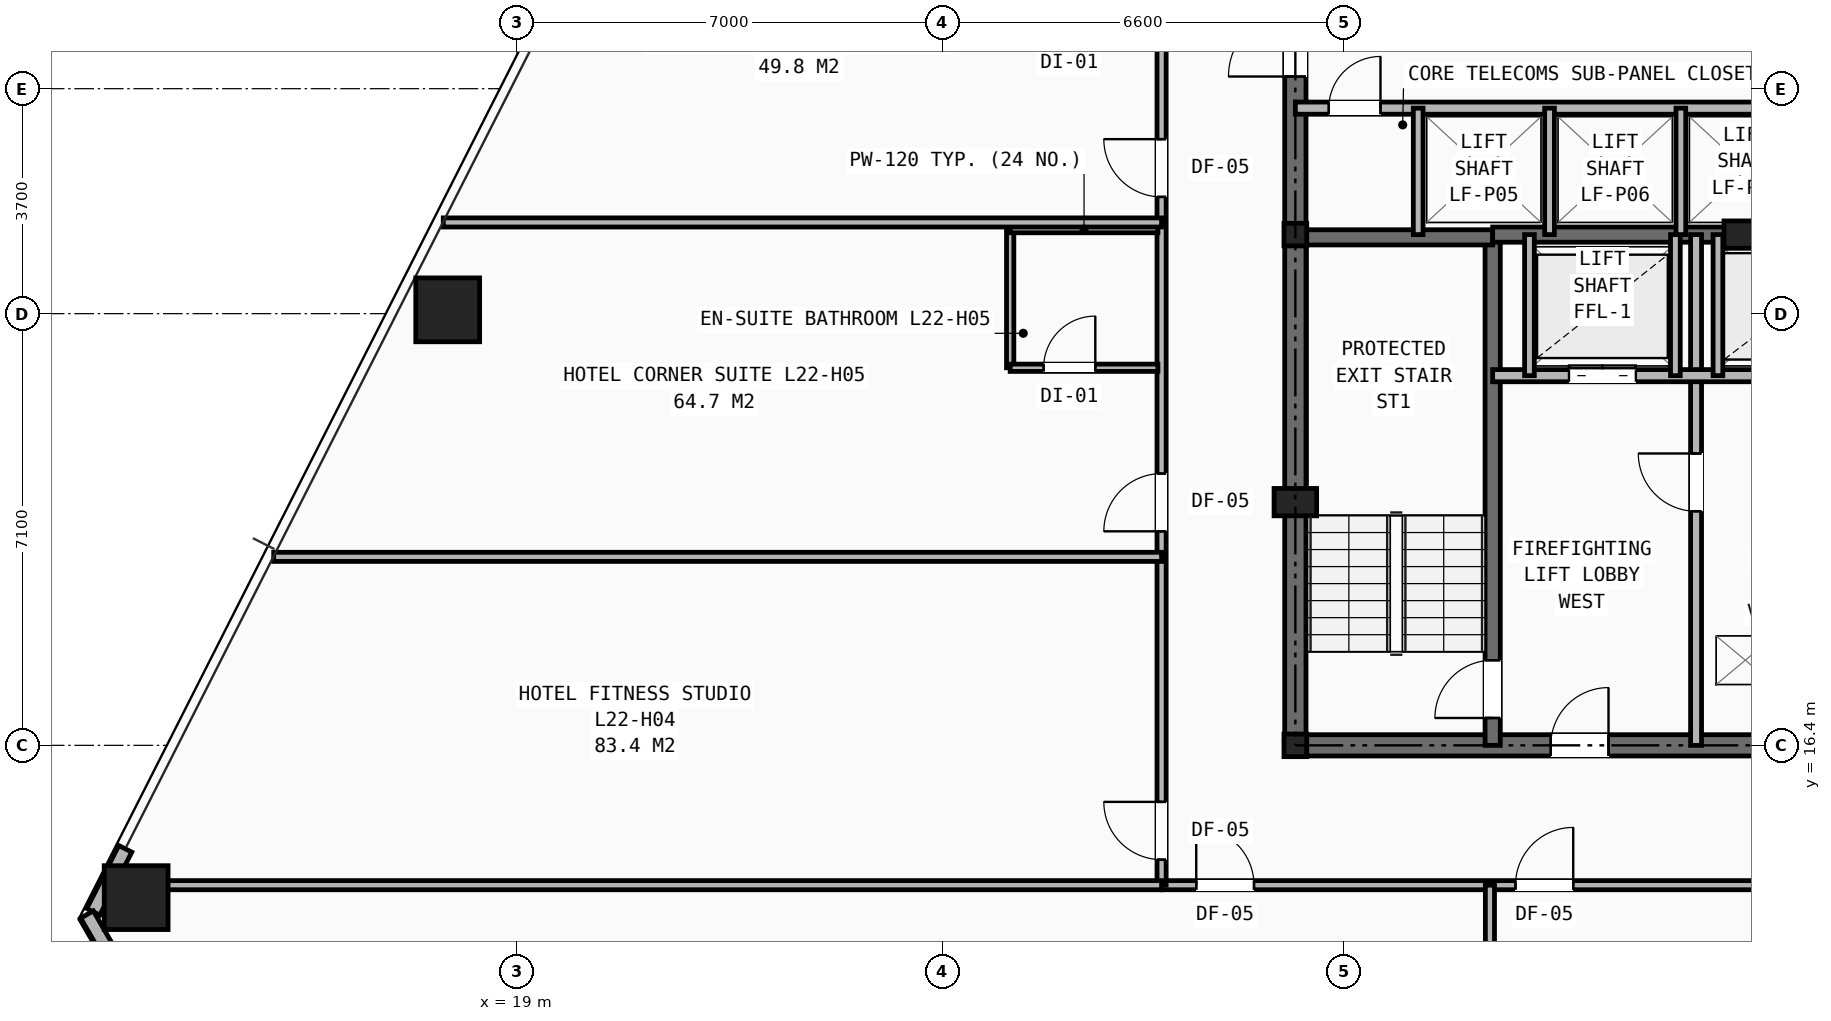
"""IFC4 building model, lengths in metres.
Left out: names, types, materials, properties, quantities, classifications, styles, units other than length and angle.
Written with IfcOpenShell. Run it as: python <this file> out.ifc"""

import sys

from ifc_helpers import new_model, si_unit, direction, frame, frame_2d, origin, origin_2d, place, context, subcontext, project, spatial, rectangle, hollow_rectangle, i_section, extrude, element, fill, save


model = new_model("IFC4")
c1 = context("Model", 3, precision=1e-05, world=origin(), true_north=direction((0.0, 1.0)))
c2 = subcontext(c1, "Body", "Model", "MODEL_VIEW")
j1 = project(units=[si_unit("LENGTHUNIT", "METRE"), si_unit("PLANEANGLEUNIT", "RADIAN")], contexts=[c1])
p1 = place(None, origin())
s1 = spatial("IfcSite", under=j1, at=p1, CompositionType="ELEMENT")
p2 = place(p1, origin())
s2 = spatial("IfcBuilding", under=s1, at=p2, CompositionType="ELEMENT")
p3 = place(p2, frame((0.0, 0.0, 79.8)))
s3 = spatial("IfcBuildingStorey", under=s2, at=p3, CompositionType="ELEMENT", Elevation=79.8)
for number, where, z_axis, x_axis in (
    (1, (31.8, 16.4, 0.0), (0.0, 0.0, 1.0), (1.0, 0.0, 0.0)),
    (2, (31.8, 24.8, 0.0), (0.0, 0.0, 1.0), (1.0, 0.0, 0.0)),
):
    element("IfcColumn", number, at=place(p3, frame(where, z_axis=z_axis, x_axis=x_axis)), inside=s3, PredefinedType="COLUMN", context=c2, shape_type="SweptSolid", body=[
        extrude(i_section(OverallWidth=0.374, OverallDepth=0.372, WebThickness=0.016, FlangeThickness=0.026, at=origin_2d()), origin(), (0.0, 0.0, 1.0), 3.2),
    ])
for number, where, z_axis, x_axis in (
    (3, (31.8, 20.4, 0.0), (0.0, 0.0, 1.0), (1.0, 0.0, 0.0)),
    (4, (39.2, 24.8, 0.0), (0.0, 0.0, 1.0), (1.0, 0.0, 0.0)),
):
    element("IfcColumn", number, at=place(p3, frame(where, z_axis=z_axis, x_axis=x_axis)), inside=s3, PredefinedType="PILASTER", context=c2, shape_type="SweptSolid", body=[
        extrude(rectangle(XDim=0.7, YDim=0.45, at=origin_2d()), origin(), (0.0, 0.0, 1.0), 3.2),
    ])
for number, where, z_axis, x_axis in (
    (5, (17.86, 23.563, 0.0), (0.0, 0.0, 1.0), (1.0, 0.0, 0.0)),
    (6, (12.736, 13.896, 0.0), (0.0, 0.0, 1.0), (1.0, 0.0, 0.0)),
):
    element("IfcColumn", number, at=place(p3, frame(where, z_axis=z_axis, x_axis=x_axis)), inside=s3, PredefinedType="COLUMN", context=c2, shape_type="SweptSolid", body=[
        extrude(hollow_rectangle(XDim=1.05, YDim=1.05, WallThickness=0.07, at=origin_2d()), origin(), (0.0, 0.0, 1.0), 3.2),
    ])
p4 = place(p3, frame((12.557, 14.698, 0.0), z_axis=(0.0, 0.0, 1.0), x_axis=(-0.452163091908, -0.891935276977, 0.0)))
e7 = element("IfcWall", 7, at=p4, inside=s3, PredefinedType="SHEAR", context=c2, shape_type="SweptSolid", body=[
    extrude(rectangle(XDim=1.163, YDim=0.24, at=frame_2d((0.581, 0.0))), origin(), (0.0, 0.0, 1.0), 2.253),
])
p5 = place(p3, frame((16.799, 5.18, 0.0), z_axis=(0.0, 0.0, 1.0), x_axis=(-0.499984915177, 0.866034112836, 0.0)))
e8 = element("IfcWall", 8, at=p5, inside=s3, PredefinedType="SHEAR", context=c2, shape_type="SweptSolid", body=[
    extrude(rectangle(XDim=9.743, YDim=0.24, at=frame_2d((4.872, 0.0))), origin(), (0.0, 0.0, 1.0), 2.253),
])
p6 = place(p3, frame((31.8, 16.4, 0.0), z_axis=(0.0, 0.0, 1.0), x_axis=(1.0, 0.0, 0.0)))
e9 = element("IfcWall", 9, at=p6, inside=s3, PredefinedType="SHEAR", context=c2, shape_type="SweptSolid", body=[
    extrude(rectangle(XDim=16.4, YDim=0.35, at=frame_2d((8.2, 0.0))), origin(), (0.0, 0.0, 1.0), 2.97),
])
p7 = place(p6, frame((7.75, 0.0, 0.0)))
e10 = element("IfcOpeningElement", 10, at=p7, cuts=e9, PredefinedType="OPENING", context=c2, shape_type="SweptSolid", body=[
    extrude(rectangle(XDim=0.9, YDim=2.1, at=frame_2d((0.45, 1.05))), frame((0.0, 0.185, 0.0), z_axis=(0.0, -1.0, 0.0), x_axis=(1.0, 0.0, 0.0)), (0.0, 0.0, 1.0), 0.37),
])
p8 = place(p6, frame((4.2, 0.0, 0.0)))
e11 = element("IfcOpeningElement", 11, at=p8, cuts=e9, PredefinedType="OPENING", context=c2, shape_type="SweptSolid", body=[
    extrude(rectangle(XDim=0.95, YDim=2.1, at=frame_2d((0.475, 1.05))), frame((0.0, 0.185, 0.0), z_axis=(0.0, -1.0, 0.0), x_axis=(1.0, 0.0, 0.0)), (0.0, 0.0, 1.0), 0.37),
])
p9 = place(p6, frame((10.6, 0.0, 0.0)))
e12 = element("IfcOpeningElement", 12, at=p9, cuts=e9, PredefinedType="OPENING", context=c2, shape_type="SweptSolid", body=[
    extrude(rectangle(XDim=0.95, YDim=2.1, at=frame_2d((0.475, 1.05))), frame((0.0, 0.185, 0.0), z_axis=(0.0, -1.0, 0.0), x_axis=(1.0, 0.0, 0.0)), (0.0, 0.0, 1.0), 0.37),
])
p10 = place(p3, frame((31.8, 16.4, 0.0), z_axis=(0.0, 0.0, 1.0), x_axis=(0.0, 1.0, 0.0)))
e13 = element("IfcWall", 13, at=p10, inside=s3, PredefinedType="SHEAR", context=c2, shape_type="SweptSolid", body=[
    extrude(rectangle(XDim=14.8, YDim=0.35, at=frame_2d((7.4, 0.0))), origin(), (0.0, 0.0, 1.0), 2.97),
])
p11 = place(p10, frame((11.0, 0.0, 0.0)))
e14 = element("IfcOpeningElement", 14, at=p11, cuts=e13, PredefinedType="OPENING", context=c2, shape_type="SweptSolid", body=[
    extrude(rectangle(XDim=1.1, YDim=2.15, at=frame_2d((0.55, 1.075))), frame((0.0, 0.185, 0.0), z_axis=(0.0, -1.0, 0.0), x_axis=(1.0, 0.0, 0.0)), (0.0, 0.0, 1.0), 0.37),
])
p12 = place(p3, frame((35.045, 16.4, 0.0), z_axis=(0.0, 0.0, 1.0), x_axis=(0.0, 1.0, 0.0)))
e15 = element("IfcWall", 15, at=p12, inside=s3, PredefinedType="SHEAR", context=c2, shape_type="SweptSolid", body=[
    extrude(rectangle(XDim=8.4, YDim=0.25, at=frame_2d((4.2, 0.0))), origin(), (0.0, 0.0, 1.0), 2.97),
])
p13 = place(p12, frame((0.45, 0.0, 0.0)))
e16 = element("IfcOpeningElement", 16, at=p13, cuts=e15, PredefinedType="OPENING", context=c2, shape_type="SweptSolid", body=[
    extrude(rectangle(XDim=0.95, YDim=2.1, at=frame_2d((0.475, 1.05))), frame((0.0, 0.135, 0.0), z_axis=(0.0, -1.0, 0.0), x_axis=(1.0, 0.0, 0.0)), (0.0, 0.0, 1.0), 0.27),
])
p14 = place(p3, frame((31.8, 24.755, 0.0), z_axis=(0.0, 0.0, 1.0), x_axis=(1.0, 0.0, 0.0)))
e17 = element("IfcWall", 17, at=p14, inside=s3, PredefinedType="SHEAR", context=c2, shape_type="SweptSolid", body=[
    extrude(rectangle(XDim=3.245, YDim=0.25, at=frame_2d((1.623, 0.0))), origin(), (0.0, 0.0, 1.0), 2.97),
])
p15 = place(p3, frame((35.045, 24.8, 0.0), z_axis=(0.0, 0.0, 1.0), x_axis=(1.0, 0.0, 0.0)))
e18 = element("IfcWall", 18, at=p15, inside=s3, PredefinedType="SHEAR", context=c2, shape_type="SweptSolid", body=[
    extrude(rectangle(XDim=9.91, YDim=0.25, at=frame_2d((4.955, 0.0))), origin(), (0.0, 0.0, 1.0), 2.97),
])
p16 = place(p3, frame((38.39, 16.4, 0.0), z_axis=(0.0, 0.0, 1.0), x_axis=(0.0, 1.0, 0.0)))
e19 = element("IfcWall", 19, at=p16, inside=s3, PredefinedType="PARTITIONING", context=c2, shape_type="SweptSolid", body=[
    extrude(rectangle(XDim=8.4, YDim=0.18, at=frame_2d((4.2, 0.0))), origin(), (0.0, 0.0, 1.0), 2.421),
])
p17 = place(p16, frame((3.85, 0.0, 0.0)))
e20 = element("IfcOpeningElement", 20, at=p17, cuts=e19, PredefinedType="OPENING", context=c2, shape_type="SweptSolid", body=[
    extrude(rectangle(XDim=0.95, YDim=2.1, at=frame_2d((0.475, 1.05))), frame((0.0, 0.1, 0.0), z_axis=(0.0, -1.0, 0.0), x_axis=(1.0, 0.0, 0.0)), (0.0, 0.0, 1.0), 0.2),
])
p18 = place(p3, frame((35.045, 22.48, 0.0), z_axis=(0.0, 0.0, 1.0), x_axis=(1.0, 0.0, 0.0)))
e21 = element("IfcWall", 21, at=p18, inside=s3, PredefinedType="SOLIDWALL", context=c2, shape_type="SweptSolid", body=[
    extrude(rectangle(XDim=9.91, YDim=0.2, at=frame_2d((4.955, 0.0))), origin(), (0.0, 0.0, 1.0), 2.97),
])
p19 = place(p18, frame((1.255, 0.0, 0.0)))
e22 = element("IfcOpeningElement", 22, at=p19, cuts=e21, PredefinedType="OPENING", context=c2, shape_type="SweptSolid", body=[
    extrude(rectangle(XDim=1.1, YDim=2.15, at=frame_2d((0.55, 1.075))), frame((0.0, 0.11, 0.0), z_axis=(0.0, -1.0, 0.0), x_axis=(1.0, 0.0, 0.0)), (0.0, 0.0, 1.0), 0.22),
])
p20 = place(p18, frame((7.555, 0.0, 0.0)))
e23 = element("IfcOpeningElement", 23, at=p20, cuts=e21, PredefinedType="OPENING", context=c2, shape_type="SweptSolid", body=[
    extrude(rectangle(XDim=1.1, YDim=2.15, at=frame_2d((0.55, 1.075))), frame((0.0, 0.11, 0.0), z_axis=(0.0, -1.0, 0.0), x_axis=(1.0, 0.0, 0.0)), (0.0, 0.0, 1.0), 0.22),
])
p21 = place(p18, frame((4.405, 0.0, 0.0)))
e24 = element("IfcOpeningElement", 24, at=p21, cuts=e21, PredefinedType="OPENING", context=c2, shape_type="SweptSolid", body=[
    extrude(rectangle(XDim=1.1, YDim=2.15, at=frame_2d((0.55, 1.075))), frame((0.0, 0.11, 0.0), z_axis=(0.0, -1.0, 0.0), x_axis=(1.0, 0.0, 0.0)), (0.0, 0.0, 1.0), 0.22),
])
for number, where, z_axis, x_axis in (
    (25, (35.65, 22.48, 0.0), (0.0, 0.0, 1.0), (0.0, 1.0, 0.0)),
    (26, (38.05, 22.48, 0.0), (0.0, 0.0, 1.0), (0.0, 1.0, 0.0)),
    (27, (38.75, 22.48, 0.0), (0.0, 0.0, 1.0), (0.0, 1.0, 0.0)),
):
    element("IfcWall", number, at=place(p3, frame(where, z_axis=z_axis, x_axis=x_axis)), inside=s3, PredefinedType="SOLIDWALL", context=c2, shape_type="SweptSolid", body=[
        extrude(rectangle(XDim=2.32, YDim=0.16, at=frame_2d((1.16, 0.0))), origin(), (0.0, 0.0, 1.0), 2.97),
    ])
p22 = place(p3, frame((31.8, 26.88, 0.0), z_axis=(0.0, 0.0, 1.0), x_axis=(1.0, 0.0, 0.0)))
e28 = element("IfcWall", 28, at=p22, inside=s3, PredefinedType="SOLIDWALL", context=c2, shape_type="SweptSolid", body=[
    extrude(rectangle(XDim=16.4, YDim=0.2, at=frame_2d((8.2, 0.0))), origin(), (0.0, 0.0, 1.0), 2.421),
])
p23 = place(p22, frame((0.55, 0.0, 0.0)))
e29 = element("IfcOpeningElement", 29, at=p23, cuts=e28, PredefinedType="OPENING", context=c2, shape_type="SweptSolid", body=[
    extrude(rectangle(XDim=0.85, YDim=2.05, at=frame_2d((0.425, 1.025))), frame((0.0, 0.11, 0.0), z_axis=(0.0, -1.0, 0.0), x_axis=(1.0, 0.0, 0.0)), (0.0, 0.0, 1.0), 0.22),
])
for number, where, z_axis, x_axis in (
    (30, (33.82, 24.8, 0.0), (0.0, 0.0, 1.0), (0.0, 1.0, 0.0)),
    (31, (35.98, 24.8, 0.0), (0.0, 0.0, 1.0), (0.0, 1.0, 0.0)),
    (32, (38.14, 24.8, 0.0), (0.0, 0.0, 1.0), (0.0, 1.0, 0.0)),
):
    element("IfcWall", number, at=place(p3, frame(where, z_axis=z_axis, x_axis=x_axis)), inside=s3, PredefinedType="SOLIDWALL", context=c2, shape_type="SweptSolid", body=[
        extrude(rectangle(XDim=2.08, YDim=0.16, at=frame_2d((1.04, 0.0))), origin(), (0.0, 0.0, 1.0), 2.97),
    ])
p24 = place(p3, frame((29.6, 14.1, 0.0), z_axis=(0.0, 0.0, 1.0), x_axis=(1.0, 0.0, 0.0)))
e33 = element("IfcWall", 33, at=p24, inside=s3, PredefinedType="PARTITIONING", context=c2, shape_type="SweptSolid", body=[
    extrude(rectangle(XDim=20.8, YDim=0.15, at=frame_2d((10.4, 0.0))), origin(), (0.0, 0.0, 1.0), 2.181),
])
p25 = place(p24, frame((0.57, 0.0, 0.0)))
e34 = element("IfcOpeningElement", 34, at=p25, cuts=e33, PredefinedType="OPENING", context=c2, shape_type="SweptSolid", body=[
    extrude(rectangle(XDim=0.95, YDim=2.1, at=frame_2d((0.475, 1.05))), frame((0.0, 0.085, 0.0), z_axis=(0.0, -1.0, 0.0), x_axis=(1.0, 0.0, 0.0)), (0.0, 0.0, 1.0), 0.17),
])
p26 = place(p24, frame((5.82, 0.0, 0.0)))
e35 = element("IfcOpeningElement", 35, at=p26, cuts=e33, PredefinedType="OPENING", context=c2, shape_type="SweptSolid", body=[
    extrude(rectangle(XDim=0.95, YDim=2.1, at=frame_2d((0.475, 1.05))), frame((0.0, 0.085, 0.0), z_axis=(0.0, -1.0, 0.0), x_axis=(1.0, 0.0, 0.0)), (0.0, 0.0, 1.0), 0.17),
])
p27 = place(p24, frame((15.02, 0.0, 0.0)))
e36 = element("IfcOpeningElement", 36, at=p27, cuts=e33, PredefinedType="OPENING", context=c2, shape_type="SweptSolid", body=[
    extrude(rectangle(XDim=0.95, YDim=2.1, at=frame_2d((0.475, 1.05))), frame((0.0, 0.085, 0.0), z_axis=(0.0, -1.0, 0.0), x_axis=(1.0, 0.0, 0.0)), (0.0, 0.0, 1.0), 0.17),
])
p28 = place(p3, frame((29.6, 14.1, 0.0), z_axis=(0.0, 0.0, 1.0), x_axis=(0.0, 1.0, 0.0)))
e37 = element("IfcWall", 37, at=p28, inside=s3, PredefinedType="PARTITIONING", context=c2, shape_type="SweptSolid", body=[
    extrude(rectangle(XDim=21.9, YDim=0.15, at=frame_2d((10.95, 0.0))), origin(), (0.0, 0.0, 1.0), 2.181),
])
p29 = place(p28, frame((0.42, 0.0, 0.0)))
e38 = element("IfcOpeningElement", 38, at=p29, cuts=e37, PredefinedType="OPENING", context=c2, shape_type="SweptSolid", body=[
    extrude(rectangle(XDim=0.95, YDim=2.1, at=frame_2d((0.475, 1.05))), frame((0.0, 0.085, 0.0), z_axis=(0.0, -1.0, 0.0), x_axis=(1.0, 0.0, 0.0)), (0.0, 0.0, 1.0), 0.17),
])
p30 = place(p28, frame((5.82, 0.0, 0.0)))
e39 = element("IfcOpeningElement", 39, at=p30, cuts=e37, PredefinedType="OPENING", context=c2, shape_type="SweptSolid", body=[
    extrude(rectangle(XDim=0.95, YDim=2.1, at=frame_2d((0.475, 1.05))), frame((0.0, 0.085, 0.0), z_axis=(0.0, -1.0, 0.0), x_axis=(1.0, 0.0, 0.0)), (0.0, 0.0, 1.0), 0.17),
])
p31 = place(p28, frame((11.32, 0.0, 0.0)))
e40 = element("IfcOpeningElement", 40, at=p31, cuts=e37, PredefinedType="OPENING", context=c2, shape_type="SweptSolid", body=[
    extrude(rectangle(XDim=0.95, YDim=2.1, at=frame_2d((0.475, 1.05))), frame((0.0, 0.085, 0.0), z_axis=(0.0, -1.0, 0.0), x_axis=(1.0, 0.0, 0.0)), (0.0, 0.0, 1.0), 0.17),
])
p32 = place(p28, frame((16.82, 0.0, 0.0)))
e41 = element("IfcOpeningElement", 41, at=p32, cuts=e37, PredefinedType="OPENING", context=c2, shape_type="SweptSolid", body=[
    extrude(rectangle(XDim=0.95, YDim=2.1, at=frame_2d((0.475, 1.05))), frame((0.0, 0.085, 0.0), z_axis=(0.0, -1.0, 0.0), x_axis=(1.0, 0.0, 0.0)), (0.0, 0.0, 1.0), 0.17),
])
p33 = place(p3, frame((35.0, 4.269, 0.0), z_axis=(0.0, 0.0, 1.0), x_axis=(0.0, 1.0, 0.0)))
e42 = element("IfcWall", 42, at=p33, inside=s3, PredefinedType="PARTITIONING", context=c2, shape_type="SweptSolid", body=[
    extrude(rectangle(XDim=9.831, YDim=0.15, at=frame_2d((4.916, 0.0))), origin(), (0.0, 0.0, 1.0), 2.181),
])
p34 = place(p3, frame((12.26, 14.1, 0.0), z_axis=(0.0, 0.0, 1.0), x_axis=(1.0, 0.0, 0.0)))
e43 = element("IfcWall", 43, at=p34, inside=s3, PredefinedType="PARTITIONING", context=c2, shape_type="SweptSolid", body=[
    extrude(rectangle(XDim=17.341, YDim=0.15, at=frame_2d((8.67, 0.0))), origin(), (0.0, 0.0, 1.0), 2.181),
])
p35 = place(p3, frame((14.998, 19.5, 0.0), z_axis=(0.0, 0.0, 1.0), x_axis=(1.0, 0.0, 0.0)))
e44 = element("IfcWall", 44, at=p35, inside=s3, PredefinedType="PARTITIONING", context=c2, shape_type="SweptSolid", body=[
    extrude(rectangle(XDim=14.602, YDim=0.15, at=frame_2d((7.301, 0.0))), origin(), (0.0, 0.0, 1.0), 2.258),
])
p36 = place(p3, frame((27.11, 22.61, 0.0), z_axis=(0.0, 0.0, 1.0), x_axis=(0.0, 1.0, 0.0)))
e45 = element("IfcWall", 45, at=p36, inside=s3, PredefinedType="PARTITIONING", context=c2, shape_type="SweptSolid", body=[
    extrude(rectangle(XDim=2.28, YDim=0.12, at=frame_2d((1.14, 0.0))), origin(), (0.0, 0.0, 1.0), 2.97),
])
p37 = place(p3, frame((27.11, 22.61, 0.0), z_axis=(0.0, 0.0, 1.0), x_axis=(1.0, 0.0, 0.0)))
e46 = element("IfcWall", 46, at=p37, inside=s3, PredefinedType="PARTITIONING", context=c2, shape_type="SweptSolid", body=[
    extrude(rectangle(XDim=2.43, YDim=0.12, at=frame_2d((1.215, 0.0))), origin(), (0.0, 0.0, 1.0), 2.97),
])
p38 = place(p37, frame((0.55, 0.0, 0.0)))
e47 = element("IfcOpeningElement", 47, at=p38, cuts=e46, PredefinedType="OPENING", context=c2, shape_type="SweptSolid", body=[
    extrude(rectangle(XDim=0.85, YDim=2.05, at=frame_2d((0.425, 1.025))), frame((0.0, 0.07, 0.0), z_axis=(0.0, -1.0, 0.0), x_axis=(1.0, 0.0, 0.0)), (0.0, 0.0, 1.0), 0.14),
])
p39 = place(p3, frame((27.11, 24.89, 0.0), z_axis=(0.0, 0.0, 1.0), x_axis=(1.0, 0.0, 0.0)))
e48 = element("IfcWall", 48, at=p39, inside=s3, PredefinedType="PARTITIONING", context=c2, shape_type="SweptSolid", body=[
    extrude(rectangle(XDim=2.43, YDim=0.12, at=frame_2d((1.215, 0.0))), origin(), (0.0, 0.0, 1.0), 2.97),
])
p40 = place(p3, frame((17.787, 25.0, 0.0), z_axis=(0.0, 0.0, 1.0), x_axis=(1.0, 0.0, 0.0)))
e49 = element("IfcWall", 49, at=p40, inside=s3, PredefinedType="PARTITIONING", context=c2, shape_type="SweptSolid", body=[
    extrude(rectangle(XDim=11.813, YDim=0.15, at=frame_2d((5.907, 0.0))), origin(), (0.0, 0.0, 1.0), 2.258),
])
p41 = place(p17, origin())
e50 = element("IfcDoor", 50, at=p41, inside=s3, OperationType="SINGLE_SWING_RIGHT", PredefinedType="DOOR", context=c2, shape_type="SweptSolid", body=[
    extrude(rectangle(XDim=0.95, YDim=2.1, at=frame_2d((0.475, 1.05))), frame((0.0, 0.025, 0.0), z_axis=(0.0, -1.0, 0.0), x_axis=(1.0, 0.0, 0.0)), (0.0, 0.0, 1.0), 0.05),
])
fill(e20, e50)
p42 = place(p13, origin())
e51 = element("IfcDoor", 51, at=p42, inside=s3, OperationType="SINGLE_SWING_LEFT", PredefinedType="DOOR", context=c2, shape_type="SweptSolid", body=[
    extrude(rectangle(XDim=0.95, YDim=2.1, at=frame_2d((0.475, 1.05))), frame((0.0, 0.025, 0.0), z_axis=(0.0, -1.0, 0.0), x_axis=(1.0, 0.0, 0.0)), (0.0, 0.0, 1.0), 0.05),
])
fill(e16, e51)
p43 = place(p8, origin())
e52 = element("IfcDoor", 52, at=p43, inside=s3, OperationType="SINGLE_SWING_RIGHT", PredefinedType="DOOR", context=c2, shape_type="SweptSolid", body=[
    extrude(rectangle(XDim=0.95, YDim=2.1, at=frame_2d((0.475, 1.05))), frame((0.0, 0.025, 0.0), z_axis=(0.0, -1.0, 0.0), x_axis=(1.0, 0.0, 0.0)), (0.0, 0.0, 1.0), 0.05),
])
fill(e11, e52)
p44 = place(p19, origin())
e53 = element("IfcDoor", 53, at=p44, inside=s3, OperationType="DOUBLE_DOOR_SLIDING", PredefinedType="DOOR", context=c2, shape_type="SweptSolid", body=[
    extrude(rectangle(XDim=1.1, YDim=2.15, at=frame_2d((0.55, 1.075))), frame((0.0, 0.025, 0.0), z_axis=(0.0, -1.0, 0.0), x_axis=(1.0, 0.0, 0.0)), (0.0, 0.0, 1.0), 0.05),
])
fill(e22, e53)
p45 = place(p23, origin())
e54 = element("IfcDoor", 54, at=p45, inside=s3, OperationType="SINGLE_SWING_RIGHT", PredefinedType="DOOR", context=c2, shape_type="SweptSolid", body=[
    extrude(rectangle(XDim=0.85, YDim=2.05, at=frame_2d((0.425, 1.025))), frame((0.0, 0.025, 0.0), z_axis=(0.0, -1.0, 0.0), x_axis=(1.0, 0.0, 0.0)), (0.0, 0.0, 1.0), 0.05),
])
fill(e29, e54)
p46 = place(p11, origin())
e55 = element("IfcDoor", 55, at=p46, inside=s3, OperationType="SINGLE_SWING_LEFT", PredefinedType="DOOR", context=c2, shape_type="SweptSolid", body=[
    extrude(rectangle(XDim=1.1, YDim=2.15, at=frame_2d((0.55, 1.075))), frame((0.0, 0.025, 0.0), z_axis=(0.0, -1.0, 0.0), x_axis=(1.0, 0.0, 0.0)), (0.0, 0.0, 1.0), 0.05),
])
fill(e14, e55)
p47 = place(p25, origin())
e56 = element("IfcDoor", 56, at=p47, inside=s3, OperationType="SINGLE_SWING_LEFT", PredefinedType="DOOR", context=c2, shape_type="SweptSolid", body=[
    extrude(rectangle(XDim=0.95, YDim=2.1, at=frame_2d((0.475, 1.05))), frame((0.0, 0.025, 0.0), z_axis=(0.0, -1.0, 0.0), x_axis=(1.0, 0.0, 0.0)), (0.0, 0.0, 1.0), 0.05),
])
fill(e34, e56)
p48 = place(p26, origin())
e57 = element("IfcDoor", 57, at=p48, inside=s3, OperationType="SINGLE_SWING_RIGHT", PredefinedType="DOOR", context=c2, shape_type="SweptSolid", body=[
    extrude(rectangle(XDim=0.95, YDim=2.1, at=frame_2d((0.475, 1.05))), frame((0.0, 0.025, 0.0), z_axis=(0.0, -1.0, 0.0), x_axis=(1.0, 0.0, 0.0)), (0.0, 0.0, 1.0), 0.05),
])
fill(e35, e57)
p49 = place(p29, origin())
e58 = element("IfcDoor", 58, at=p49, inside=s3, OperationType="SINGLE_SWING_RIGHT", PredefinedType="DOOR", context=c2, shape_type="SweptSolid", body=[
    extrude(rectangle(XDim=0.95, YDim=2.1, at=frame_2d((0.475, 1.05))), frame((0.0, 0.025, 0.0), z_axis=(0.0, -1.0, 0.0), x_axis=(1.0, 0.0, 0.0)), (0.0, 0.0, 1.0), 0.05),
])
fill(e38, e58)
p50 = place(p30, origin())
e59 = element("IfcDoor", 59, at=p50, inside=s3, OperationType="SINGLE_SWING_LEFT", PredefinedType="DOOR", context=c2, shape_type="SweptSolid", body=[
    extrude(rectangle(XDim=0.95, YDim=2.1, at=frame_2d((0.475, 1.05))), frame((0.0, 0.025, 0.0), z_axis=(0.0, -1.0, 0.0), x_axis=(1.0, 0.0, 0.0)), (0.0, 0.0, 1.0), 0.05),
])
fill(e39, e59)
p51 = place(p38, origin())
e60 = element("IfcDoor", 60, at=p51, inside=s3, OperationType="SINGLE_SWING_RIGHT", PredefinedType="DOOR", context=c2, shape_type="SweptSolid", body=[
    extrude(rectangle(XDim=0.85, YDim=2.05, at=frame_2d((0.425, 1.025))), frame((0.0, 0.025, 0.0), z_axis=(0.0, -1.0, 0.0), x_axis=(1.0, 0.0, 0.0)), (0.0, 0.0, 1.0), 0.05),
])
fill(e47, e60)
p52 = place(p31, origin())
e61 = element("IfcDoor", 61, at=p52, inside=s3, OperationType="SINGLE_SWING_RIGHT", PredefinedType="DOOR", context=c2, shape_type="SweptSolid", body=[
    extrude(rectangle(XDim=0.95, YDim=2.1, at=frame_2d((0.475, 1.05))), frame((0.0, 0.025, 0.0), z_axis=(0.0, -1.0, 0.0), x_axis=(1.0, 0.0, 0.0)), (0.0, 0.0, 1.0), 0.05),
])
fill(e40, e61)
save(model, sys.argv[1])
